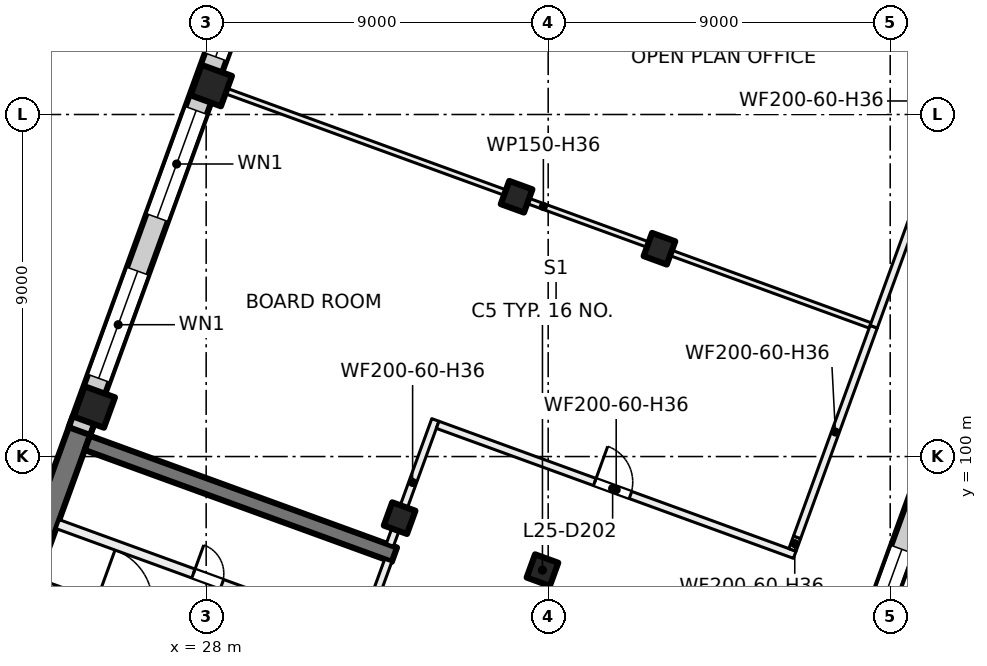
"""IFC4 building model, lengths in metres.
Left out: names, types, materials, properties, quantities, classifications, styles, units other than length and angle.
Written with IfcOpenShell. Run it as: python <this file> out.ifc"""

import sys

from ifc_helpers import new_model, si_unit, direction, frame, frame_2d, origin, origin_2d, place, context, subcontext, project, spatial, rectangle, extrude, element, fill, save


model = new_model("IFC4")
c1 = context("Model", 3, precision=1e-05, world=origin(), true_north=direction((0.0, 1.0)))
c2 = subcontext(c1, "Body", "Model", "MODEL_VIEW")
j1 = project(units=[si_unit("LENGTHUNIT", "METRE"), si_unit("PLANEANGLEUNIT", "RADIAN")], contexts=[c1])
p1 = place(None, origin())
s1 = spatial("IfcSite", under=j1, at=p1, CompositionType="ELEMENT")
p2 = place(p1, origin())
s2 = spatial("IfcBuilding", under=s1, at=p2, CompositionType="ELEMENT")
p3 = place(p2, frame((0.0, 0.0, 109.0)))
s3 = spatial("IfcBuildingStorey", under=s2, at=p3, CompositionType="ELEMENT", Elevation=109.0)
for number, where, z_axis, x_axis in (
    (1, (39.927, 105.468, 0.0), (0.0, 0.0, 1.0), (-0.342, -0.94, 0.0)),
    (2, (36.849, 97.011, 0.0), (0.0, 0.0, 1.0), (-0.342, -0.94, 0.0)),
    (3, (36.169, 106.836, 0.0), (0.0, 0.0, 1.0), (-0.342, -0.94, 0.0)),
    (4, (33.091, 98.379, 0.0), (0.0, 0.0, 1.0), (-0.342, -0.94, 0.0)),
):
    element("IfcColumn", number, at=place(p3, frame(where, z_axis=z_axis, x_axis=x_axis)), inside=s3, PredefinedType="COLUMN", context=c2, shape_type="SweptSolid", body=[
        extrude(rectangle(XDim=0.65, YDim=0.65, at=origin_2d()), origin(), (0.0, 0.0, 1.0), 4.0),
    ])
for number, where, z_axis, x_axis in (
    (5, (28.134, 109.76, 0.0), (0.0, 0.0, 1.0), (-0.342, -0.94, 0.0)),
    (6, (25.056, 101.303, 0.0), (0.0, 0.0, 1.0), (-0.342, -0.94, 0.0)),
):
    element("IfcColumn", number, at=place(p3, frame(where, z_axis=z_axis, x_axis=x_axis)), inside=s3, PredefinedType="COLUMN", context=c2, shape_type="SweptSolid", body=[
        extrude(rectangle(XDim=0.85, YDim=0.85, at=origin_2d()), origin(), (0.0, 0.0, 1.0), 4.0),
    ])
p4 = place(p3, frame((21.717, 92.568, 0.0), z_axis=(0.0, 0.0, 1.0), x_axis=(0.342017595281, 0.939693548195, 0.0)))
e7 = element("IfcWall", 7, at=p4, inside=s3, PredefinedType="SHEAR", context=c2, shape_type="SweptSolid", body=[
    extrude(rectangle(XDim=8.925, YDim=0.6, at=frame_2d((4.462, 0.0))), origin(), (0.0, 0.0, 1.0), 4.0),
])
p5 = place(p3, frame((32.953, 97.418, 0.0), z_axis=(0.0, 0.0, 1.0), x_axis=(-0.93969060187, 0.342025690201, 0.0)))
e8 = element("IfcWall", 8, at=p5, inside=s3, PredefinedType="SHEAR", context=c2, shape_type="SweptSolid", body=[
    extrude(rectangle(XDim=8.6, YDim=0.4, at=frame_2d((4.3, 0.0))), origin(), (0.0, 0.0, 1.0), 4.0),
])
p6 = place(p3, frame((51.877, 112.862, 0.0), z_axis=(0.0, 0.0, 1.0), x_axis=(-0.342020589714, -0.939692458314, 0.0)))
e9 = element("IfcWall", 9, at=p6, inside=s3, PredefinedType="SOLIDWALL", context=c2, shape_type="SweptSolid", body=[
    extrude(rectangle(XDim=20.765, YDim=0.6, at=frame_2d((10.382, 0.0))), origin(), (0.0, 0.0, 1.0), 3.625),
])
p7 = place(p6, frame((2.785, 0.0, 0.9)))
e10 = element("IfcOpeningElement", 10, at=p7, cuts=e9, PredefinedType="OPENING", context=c2, shape_type="SweptSolid", body=[
    extrude(rectangle(XDim=3.0, YDim=2.4, at=frame_2d((1.5, 1.2))), frame((0.0, 0.31, 0.0), z_axis=(0.0, -1.0, 0.0), x_axis=(1.0, 0.0, 0.0)), (0.0, 0.0, 1.0), 0.62),
])
p8 = place(p6, frame((7.285, 0.0, 0.9)))
e11 = element("IfcOpeningElement", 11, at=p8, cuts=e9, PredefinedType="OPENING", context=c2, shape_type="SweptSolid", body=[
    extrude(rectangle(XDim=3.0, YDim=2.4, at=frame_2d((1.5, 1.2))), frame((0.0, 0.31, 0.0), z_axis=(0.0, -1.0, 0.0), x_axis=(1.0, 0.0, 0.0)), (0.0, 0.0, 1.0), 0.62),
])
p9 = place(p6, frame((11.785, 0.0, 0.9)))
e12 = element("IfcOpeningElement", 12, at=p9, cuts=e9, PredefinedType="OPENING", context=c2, shape_type="SweptSolid", body=[
    extrude(rectangle(XDim=3.0, YDim=2.4, at=frame_2d((1.5, 1.2))), frame((0.0, 0.31, 0.0), z_axis=(0.0, -1.0, 0.0), x_axis=(1.0, 0.0, 0.0)), (0.0, 0.0, 1.0), 0.62),
])
p10 = place(p6, frame((16.285, 0.0, 0.9)))
e13 = element("IfcOpeningElement", 13, at=p10, cuts=e9, PredefinedType="OPENING", context=c2, shape_type="SweptSolid", body=[
    extrude(rectangle(XDim=3.0, YDim=2.4, at=frame_2d((1.5, 1.2))), frame((0.0, 0.31, 0.0), z_axis=(0.0, -1.0, 0.0), x_axis=(1.0, 0.0, 0.0)), (0.0, 0.0, 1.0), 0.62),
])
p11 = place(p3, frame((24.666, 100.669, 0.0), z_axis=(0.0, 0.0, 1.0), x_axis=(0.34201964167, 0.939692803373, 0.0)))
e14 = element("IfcWall", 14, at=p11, inside=s3, PredefinedType="SOLIDWALL", context=c2, shape_type="SweptSolid", body=[
    extrude(rectangle(XDim=32.884, YDim=0.6, at=frame_2d((16.442, 0.0))), origin(), (0.0, 0.0, 1.0), 3.625),
])
p12 = place(p11, frame((1.48, 0.0, 0.9)))
e15 = element("IfcOpeningElement", 15, at=p12, cuts=e14, PredefinedType="OPENING", context=c2, shape_type="SweptSolid", body=[
    extrude(rectangle(XDim=3.0, YDim=2.4, at=frame_2d((1.5, 1.2))), frame((0.0, 0.31, 0.0), z_axis=(0.0, -1.0, 0.0), x_axis=(1.0, 0.0, 0.0)), (0.0, 0.0, 1.0), 0.62),
])
p13 = place(p11, frame((5.98, 0.0, 0.9)))
e16 = element("IfcOpeningElement", 16, at=p13, cuts=e14, PredefinedType="OPENING", context=c2, shape_type="SweptSolid", body=[
    extrude(rectangle(XDim=3.0, YDim=2.4, at=frame_2d((1.5, 1.2))), frame((0.0, 0.31, 0.0), z_axis=(0.0, -1.0, 0.0), x_axis=(1.0, 0.0, 0.0)), (0.0, 0.0, 1.0), 0.62),
])
p14 = place(p11, frame((10.48, 0.0, 0.9)))
e17 = element("IfcOpeningElement", 17, at=p14, cuts=e14, PredefinedType="OPENING", context=c2, shape_type="SweptSolid", body=[
    extrude(rectangle(XDim=3.0, YDim=2.4, at=frame_2d((1.5, 1.2))), frame((0.0, 0.31, 0.0), z_axis=(0.0, -1.0, 0.0), x_axis=(1.0, 0.0, 0.0)), (0.0, 0.0, 1.0), 0.62),
])
p15 = place(p11, frame((14.98, 0.0, 0.9)))
e18 = element("IfcOpeningElement", 18, at=p15, cuts=e14, PredefinedType="OPENING", context=c2, shape_type="SweptSolid", body=[
    extrude(rectangle(XDim=3.0, YDim=2.4, at=frame_2d((1.5, 1.2))), frame((0.0, 0.31, 0.0), z_axis=(0.0, -1.0, 0.0), x_axis=(1.0, 0.0, 0.0)), (0.0, 0.0, 1.0), 0.62),
])
p16 = place(p11, frame((19.48, 0.0, 0.9)))
e19 = element("IfcOpeningElement", 19, at=p16, cuts=e14, PredefinedType="OPENING", context=c2, shape_type="SweptSolid", body=[
    extrude(rectangle(XDim=3.0, YDim=2.4, at=frame_2d((1.5, 1.2))), frame((0.0, 0.31, 0.0), z_axis=(0.0, -1.0, 0.0), x_axis=(1.0, 0.0, 0.0)), (0.0, 0.0, 1.0), 0.62),
])
p17 = place(p11, frame((23.98, 0.0, 0.9)))
e20 = element("IfcOpeningElement", 20, at=p17, cuts=e14, PredefinedType="OPENING", context=c2, shape_type="SweptSolid", body=[
    extrude(rectangle(XDim=3.0, YDim=2.4, at=frame_2d((1.5, 1.2))), frame((0.0, 0.31, 0.0), z_axis=(0.0, -1.0, 0.0), x_axis=(1.0, 0.0, 0.0)), (0.0, 0.0, 1.0), 0.62),
])
p18 = place(p11, frame((28.48, 0.0, 0.9)))
e21 = element("IfcOpeningElement", 21, at=p18, cuts=e14, PredefinedType="OPENING", context=c2, shape_type="SweptSolid", body=[
    extrude(rectangle(XDim=3.0, YDim=2.4, at=frame_2d((1.5, 1.2))), frame((0.0, 0.31, 0.0), z_axis=(0.0, -1.0, 0.0), x_axis=(1.0, 0.0, 0.0)), (0.0, 0.0, 1.0), 0.62),
])
p19 = place(p3, frame((31.491, 93.693, 0.0), z_axis=(0.0, 0.0, 1.0), x_axis=(0.341995824804, 0.939701471648, 0.0)))
e22 = element("IfcWall", 22, at=p19, inside=s3, PredefinedType="PARTITIONING", context=c2, shape_type="SweptSolid", body=[
    extrude(rectangle(XDim=3.8, YDim=0.2, at=frame_2d((1.9, 0.0))), origin(), (0.0, 0.0, 1.0), 3.625),
])
p20 = place(p19, frame((0.3, 0.0, 0.0)))
e23 = element("IfcOpeningElement", 23, at=p20, cuts=e22, PredefinedType="OPENING", context=c2, shape_type="SweptSolid", body=[
    extrude(rectangle(XDim=1.2, YDim=2.1, at=frame_2d((0.6, 1.05))), frame((0.0, 0.11, 0.0), z_axis=(0.0, -1.0, 0.0), x_axis=(1.0, 0.0, 0.0)), (0.0, 0.0, 1.0), 0.22),
])
p21 = place(p3, frame((23.538, 96.694, 0.0), z_axis=(0.0, 0.0, 1.0), x_axis=(0.939691552312, -0.342023078919, 0.0)))
e24 = element("IfcWall", 24, at=p21, inside=s3, PredefinedType="PARTITIONING", context=c2, shape_type="SweptSolid", body=[
    extrude(rectangle(XDim=8.4, YDim=0.2, at=frame_2d((4.2, 0.0))), origin(), (0.0, 0.0, 1.0), 3.625),
])
p22 = place(p21, frame((1.65, 0.0, 0.0)))
e25 = element("IfcOpeningElement", 25, at=p22, cuts=e24, PredefinedType="OPENING", context=c2, shape_type="SweptSolid", body=[
    extrude(rectangle(XDim=1.5, YDim=2.1, at=frame_2d((0.75, 1.05))), frame((0.0, 0.11, 0.0), z_axis=(0.0, -1.0, 0.0), x_axis=(1.0, 0.0, 0.0)), (0.0, 0.0, 1.0), 0.22),
])
p23 = place(p3, frame((24.094, 98.221, 0.0), z_axis=(0.0, 0.0, 1.0), x_axis=(0.939691552312, -0.342023078919, 0.0)))
e26 = element("IfcWall", 26, at=p23, inside=s3, PredefinedType="PARTITIONING", context=c2, shape_type="SweptSolid", body=[
    extrude(rectangle(XDim=8.4, YDim=0.25, at=frame_2d((4.2, 0.0))), origin(), (0.0, 0.0, 1.0), 3.625),
])
p24 = place(p23, frame((3.8, 0.0, 0.0)))
e27 = element("IfcOpeningElement", 27, at=p24, cuts=e26, PredefinedType="OPENING", context=c2, shape_type="SweptSolid", body=[
    extrude(rectangle(XDim=0.8, YDim=2.1, at=frame_2d((0.4, 1.05))), frame((0.0, 0.135, 0.0), z_axis=(0.0, -1.0, 0.0), x_axis=(1.0, 0.0, 0.0)), (0.0, 0.0, 1.0), 0.27),
])
p25 = place(p3, frame((28.275, 109.709, 0.0), z_axis=(0.0, 0.0, 1.0), x_axis=(0.939695619185, -0.342011905181, 0.0)))
e28 = element("IfcWall", 28, at=p25, inside=s3, PredefinedType="PARTITIONING", context=c2, shape_type="SweptSolid", body=[
    extrude(rectangle(XDim=18.301, YDim=0.15, at=frame_2d((9.15, 0.0))), origin(), (0.0, 0.0, 1.0), 3.625),
])
p26 = place(p3, frame((32.834, 97.674, 0.0), z_axis=(0.0, 0.0, 1.0), x_axis=(0.342017493073, 0.939693585395, 0.0)))
e29 = element("IfcWall", 29, at=p26, inside=s3, PredefinedType="PARTITIONING", context=c2, shape_type="SweptSolid", body=[
    extrude(rectangle(XDim=3.5, YDim=0.2, at=frame_2d((1.75, 0.0))), origin(), (0.0, 0.0, 1.0), 3.625),
])
p27 = place(p3, frame((34.091, 100.835, 0.0), z_axis=(0.0, 0.0, 1.0), x_axis=(0.939702148643, -0.341993964619, 0.0)))
e30 = element("IfcWall", 30, at=p27, inside=s3, PredefinedType="PARTITIONING", context=c2, shape_type="SweptSolid", body=[
    extrude(rectangle(XDim=10.0, YDim=0.2, at=frame_2d((5.0, 0.0))), origin(), (0.0, 0.0, 1.0), 3.625),
])
p28 = place(p27, frame((4.4, 0.0, 0.0)))
e31 = element("IfcOpeningElement", 31, at=p28, cuts=e30, PredefinedType="OPENING", context=c2, shape_type="SweptSolid", body=[
    extrude(rectangle(XDim=1.0, YDim=2.1, at=frame_2d((0.5, 1.05))), frame((0.0, 0.11, 0.0), z_axis=(0.0, -1.0, 0.0), x_axis=(1.0, 0.0, 0.0)), (0.0, 0.0, 1.0), 0.22),
])
p29 = place(p3, frame((43.428, 97.543, 0.0), z_axis=(0.0, 0.0, 1.0), x_axis=(0.342630345101, 0.939470301083, 0.0)))
e32 = element("IfcWall", 32, at=p29, inside=s3, PredefinedType="PARTITIONING", context=c2, shape_type="SweptSolid", body=[
    extrude(rectangle(XDim=0.354, YDim=0.2, at=frame_2d((0.177, 0.0))), origin(), (0.0, 0.0, 1.0), 3.625),
])
p30 = place(p3, frame((43.549, 97.875, 0.0), z_axis=(0.0, 0.0, 1.0), x_axis=(0.342032265241, 0.939688208681, 0.0)))
e33 = element("IfcWall", 33, at=p30, inside=s3, PredefinedType="PARTITIONING", context=c2, shape_type="SweptSolid", body=[
    extrude(rectangle(XDim=5.897, YDim=0.2, at=frame_2d((2.948, 0.0))), origin(), (0.0, 0.0, 1.0), 3.625),
])
p31 = place(p3, frame((45.566, 103.416, 0.0), z_axis=(0.0, 0.0, 1.0), x_axis=(0.342023697047, 0.939691327329, 0.0)))
e34 = element("IfcWall", 34, at=p31, inside=s3, PredefinedType="PARTITIONING", context=c2, shape_type="SweptSolid", body=[
    extrude(rectangle(XDim=12.642, YDim=0.2, at=frame_2d((6.321, 0.0))), origin(), (0.0, 0.0, 1.0), 3.625),
])
p32 = place(p31, frame((5.819, 0.0, 0.0)))
e35 = element("IfcOpeningElement", 35, at=p32, cuts=e34, PredefinedType="OPENING", context=c2, shape_type="SweptSolid", body=[
    extrude(rectangle(XDim=1.0, YDim=2.1, at=frame_2d((0.5, 1.05))), frame((0.0, 0.11, 0.0), z_axis=(0.0, -1.0, 0.0), x_axis=(1.0, 0.0, 0.0)), (0.0, 0.0, 1.0), 0.22),
])
p33 = place(p10, origin())
e36 = element("IfcWindow", 36, at=p33, inside=s3, PartitioningType="SINGLE_PANEL", PredefinedType="WINDOW", context=c2, shape_type="SweptSolid", body=[
    extrude(rectangle(XDim=3.0, YDim=2.4, at=frame_2d((1.5, 1.2))), frame((0.0, 0.03, 0.0), z_axis=(0.0, -1.0, 0.0), x_axis=(1.0, 0.0, 0.0)), (0.0, 0.0, 1.0), 0.06),
])
fill(e13, e36)
p34 = place(p12, origin())
e37 = element("IfcWindow", 37, at=p34, inside=s3, PartitioningType="SINGLE_PANEL", PredefinedType="WINDOW", context=c2, shape_type="SweptSolid", body=[
    extrude(rectangle(XDim=3.0, YDim=2.4, at=frame_2d((1.5, 1.2))), frame((0.0, 0.03, 0.0), z_axis=(0.0, -1.0, 0.0), x_axis=(1.0, 0.0, 0.0)), (0.0, 0.0, 1.0), 0.06),
])
fill(e15, e37)
p35 = place(p13, origin())
e38 = element("IfcWindow", 38, at=p35, inside=s3, PartitioningType="SINGLE_PANEL", PredefinedType="WINDOW", context=c2, shape_type="SweptSolid", body=[
    extrude(rectangle(XDim=3.0, YDim=2.4, at=frame_2d((1.5, 1.2))), frame((0.0, 0.03, 0.0), z_axis=(0.0, -1.0, 0.0), x_axis=(1.0, 0.0, 0.0)), (0.0, 0.0, 1.0), 0.06),
])
fill(e16, e38)
p36 = place(p14, origin())
e39 = element("IfcWindow", 39, at=p36, inside=s3, PartitioningType="SINGLE_PANEL", PredefinedType="WINDOW", context=c2, shape_type="SweptSolid", body=[
    extrude(rectangle(XDim=3.0, YDim=2.4, at=frame_2d((1.5, 1.2))), frame((0.0, 0.03, 0.0), z_axis=(0.0, -1.0, 0.0), x_axis=(1.0, 0.0, 0.0)), (0.0, 0.0, 1.0), 0.06),
])
fill(e17, e39)
p37 = place(p24, origin())
e40 = element("IfcDoor", 40, at=p37, inside=s3, OperationType="SINGLE_SWING_LEFT", PredefinedType="DOOR", context=c2, shape_type="SweptSolid", body=[
    extrude(rectangle(XDim=0.8, YDim=2.1, at=frame_2d((0.4, 1.05))), frame((0.0, 0.025, 0.0), z_axis=(0.0, -1.0, 0.0), x_axis=(1.0, 0.0, 0.0)), (0.0, 0.0, 1.0), 0.05),
])
fill(e27, e40)
p38 = place(p28, origin())
e41 = element("IfcDoor", 41, at=p38, inside=s3, OperationType="SINGLE_SWING_LEFT", PredefinedType="DOOR", context=c2, shape_type="SweptSolid", body=[
    extrude(rectangle(XDim=1.0, YDim=2.1, at=frame_2d((0.5, 1.05))), frame((0.0, 0.025, 0.0), z_axis=(0.0, -1.0, 0.0), x_axis=(1.0, 0.0, 0.0)), (0.0, 0.0, 1.0), 0.05),
])
fill(e31, e41)
save(model, sys.argv[1])
